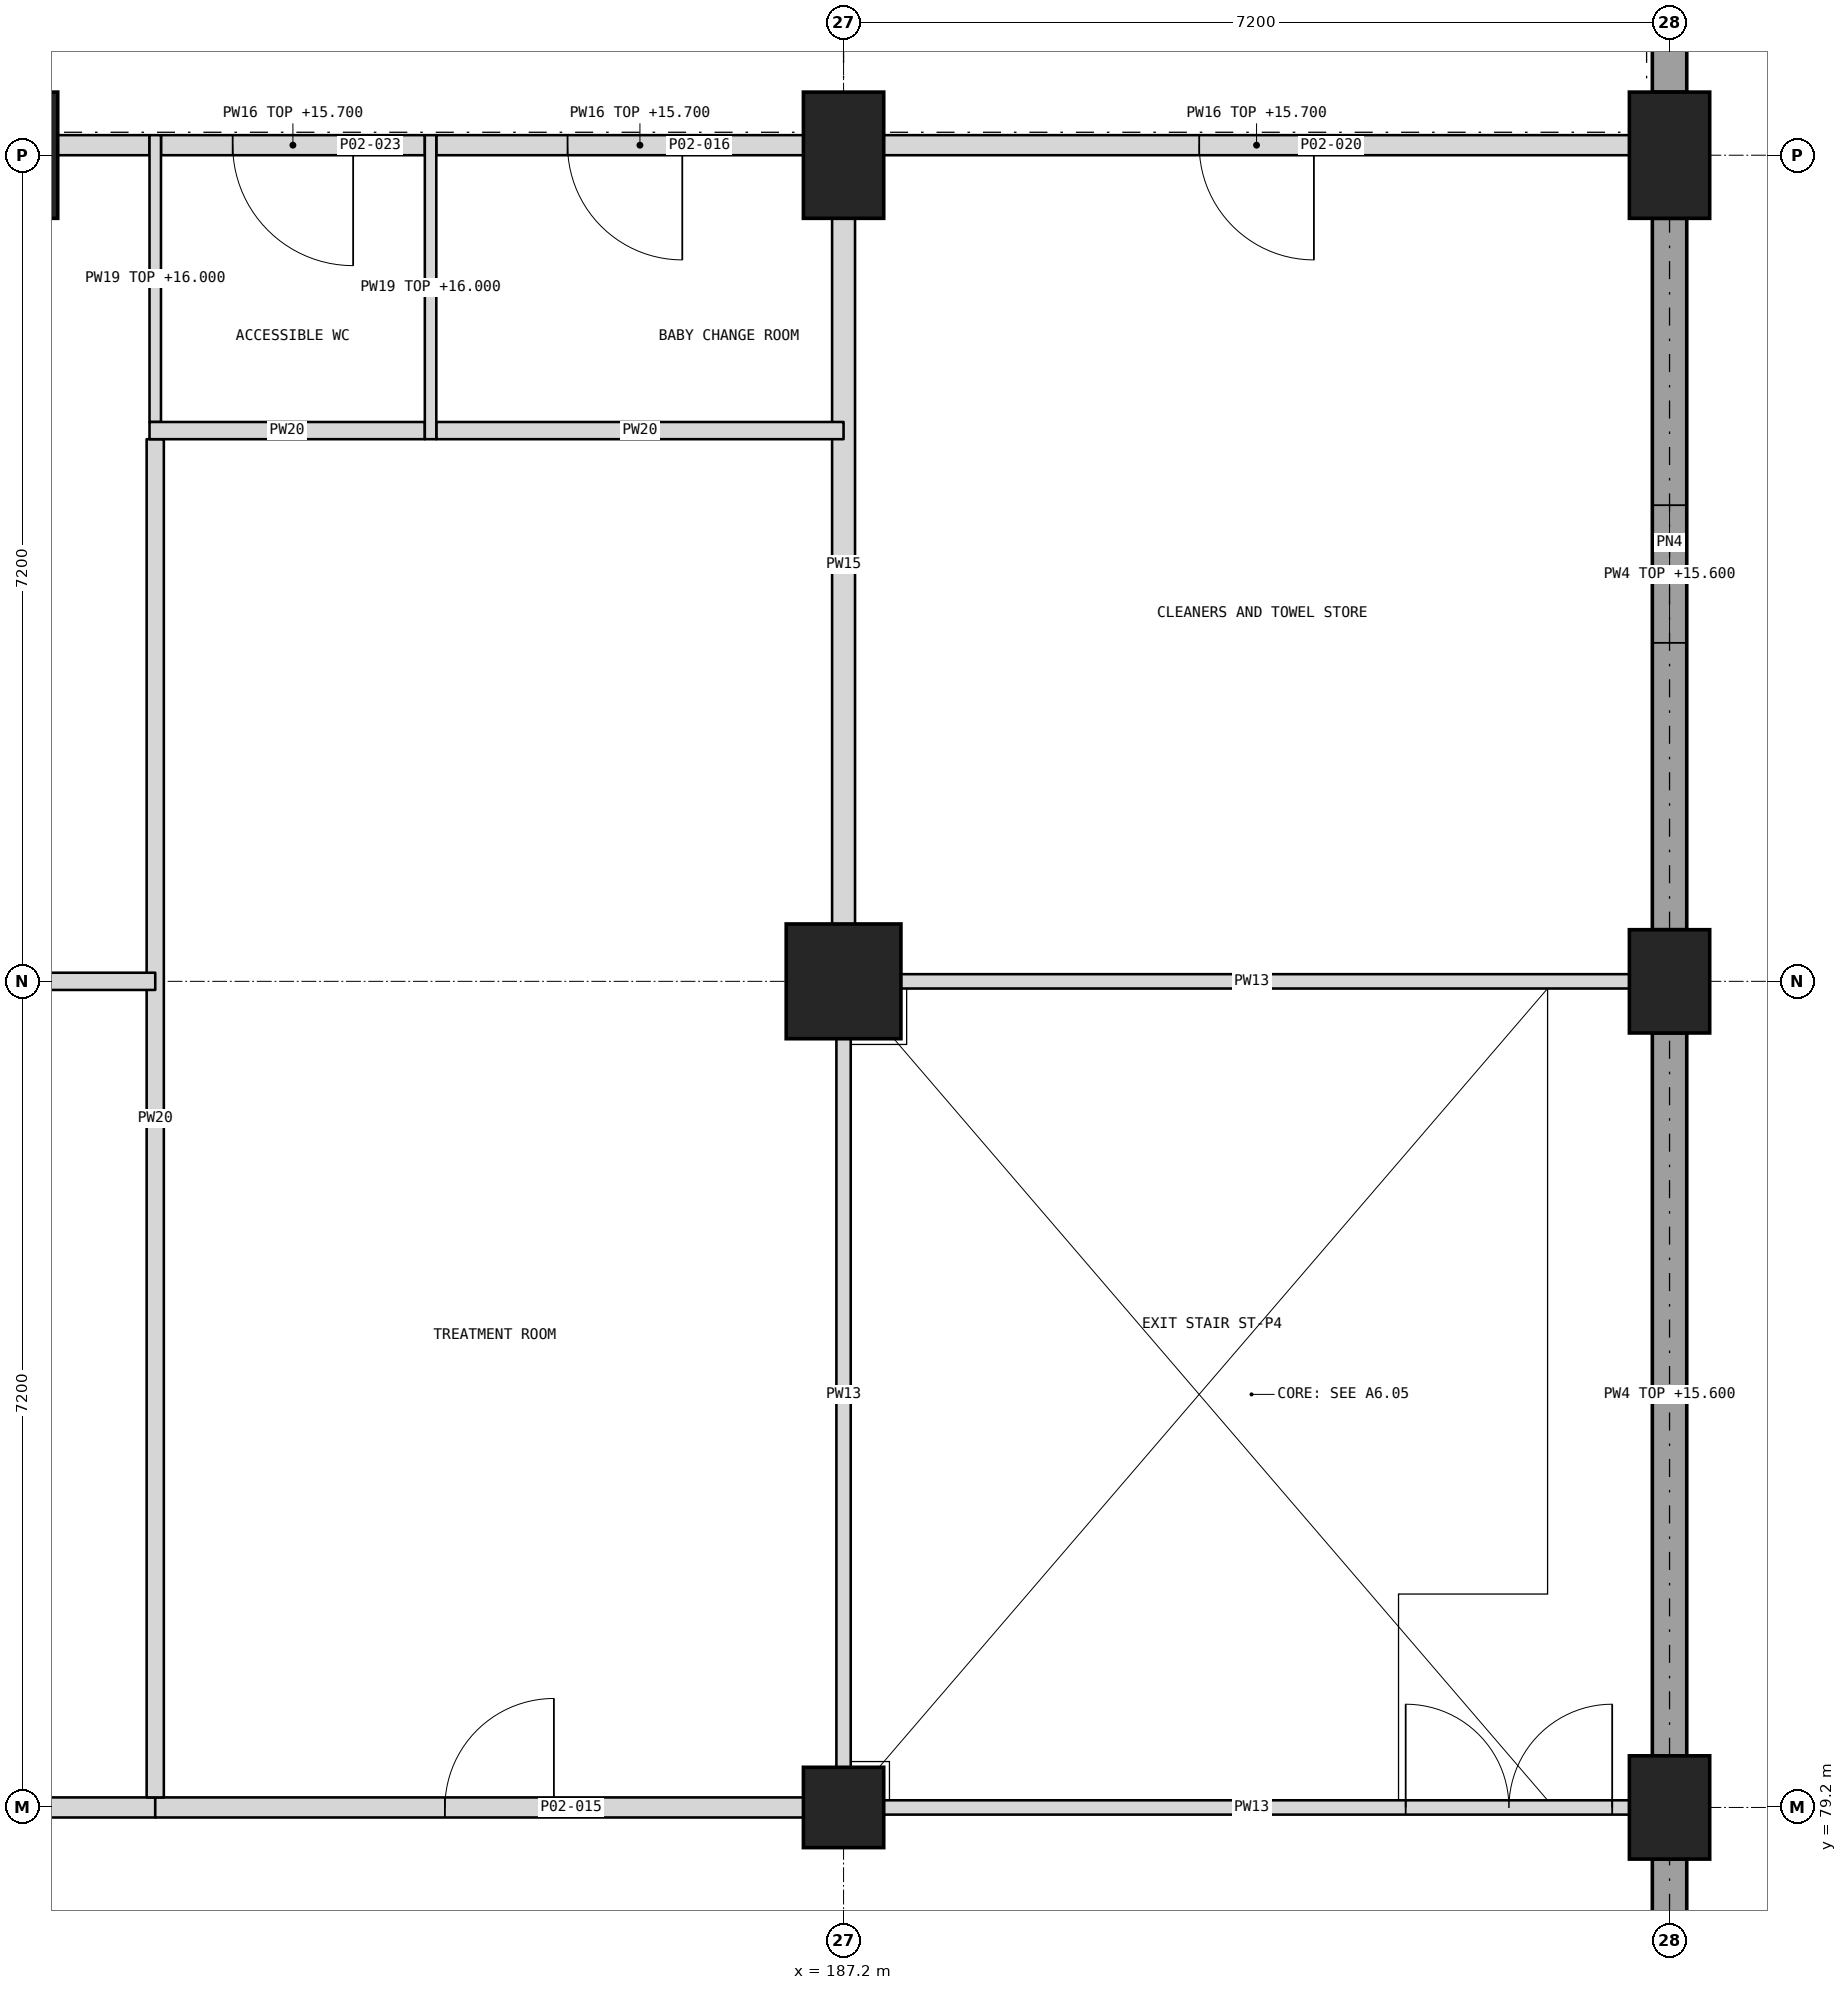
"""IFC4 building model, lengths in metres.
Left out: names, types, materials, properties, quantities, classifications, styles, units other than length and angle.
Written with IfcOpenShell. Run it as: python <this file> out.ifc"""

import sys

from ifc_helpers import new_model, si_unit, direction, frame, frame_2d, origin, origin_2d, place, context, subcontext, project, spatial, rectangle, extrude, element, fill, save


model = new_model("IFC4")
c1 = context("Model", 3, precision=1e-05, world=origin(), true_north=direction((0.0, 1.0)))
c2 = subcontext(c1, "Body", "Model", "MODEL_VIEW")
j1 = project(units=[si_unit("LENGTHUNIT", "METRE"), si_unit("PLANEANGLEUNIT", "RADIAN")], contexts=[c1])
p1 = place(None, origin())
s1 = spatial("IfcSite", under=j1, at=p1, CompositionType="ELEMENT")
p2 = place(p1, origin())
s2 = spatial("IfcBuilding", under=s1, at=p2, CompositionType="ELEMENT")
p3 = place(p2, frame((0.0, 0.0, 12.0)))
s3 = spatial("IfcBuildingStorey", under=s2, at=p3, CompositionType="ELEMENT", Elevation=12.0)
p4 = place(p3, frame((187.2, 79.2, 0.0), z_axis=(0.0, 0.0, 1.0), x_axis=(1.0, 0.0, 0.0)))
e1 = element("IfcColumn", 1, at=p4, inside=s3, PredefinedType="COLUMN", context=c2, shape_type="SweptSolid", body=[
    extrude(rectangle(XDim=0.7, YDim=0.7, at=origin_2d()), origin(), (0.0, 0.0, 1.0), 4.5),
])
p5 = place(p3, frame((187.2, 86.4, 0.0), z_axis=(0.0, 0.0, 1.0), x_axis=(1.0, 0.0, 0.0)))
e2 = element("IfcColumn", 2, at=p5, inside=s3, PredefinedType="COLUMN", context=c2, shape_type="SweptSolid", body=[
    extrude(rectangle(XDim=1.0, YDim=1.0, at=origin_2d()), origin(), (0.0, 0.0, 1.0), 4.5),
])
for number, where, z_axis, x_axis in (
    (3, (194.4, 79.2, 0.0), (0.0, 0.0, 1.0), (1.0, 0.0, 0.0)),
    (4, (194.4, 86.4, 0.0), (0.0, 0.0, 1.0), (1.0, 0.0, 0.0)),
):
    element("IfcColumn", number, at=place(p3, frame(where, z_axis=z_axis, x_axis=x_axis)), inside=s3, PredefinedType="COLUMN", context=c2, shape_type="SweptSolid", body=[
        extrude(rectangle(XDim=0.7, YDim=0.9, at=origin_2d()), origin(), (0.0, 0.0, 1.0), 4.5),
    ])
for number, where, z_axis, x_axis in (
    (5, (180.0, 93.6, 0.0), (0.0, 0.0, 1.0), (1.0, 0.0, 0.0)),
    (6, (187.2, 93.6, 0.0), (0.0, 0.0, 1.0), (1.0, 0.0, 0.0)),
    (7, (194.4, 93.6, 0.0), (0.0, 0.0, 1.0), (1.0, 0.0, 0.0)),
):
    element("IfcColumn", number, at=place(p3, frame(where, z_axis=z_axis, x_axis=x_axis)), inside=s3, PredefinedType="COLUMN", context=c2, shape_type="SweptSolid", body=[
        extrude(rectangle(XDim=0.7, YDim=1.1, at=origin_2d()), origin(), (0.0, 0.0, 1.0), 4.5),
    ])
p6 = place(p3, frame((194.4, 72.45, 0.0), z_axis=(0.0, 0.0, 1.0), x_axis=(0.0, 1.0, 0.0)))
e8 = element("IfcWall", 8, at=p6, inside=s3, PredefinedType="SOLIDWALL", context=c2, shape_type="SweptSolid", body=[
    extrude(rectangle(XDim=6.3, YDim=0.3, at=frame_2d((3.15, 0.0))), origin(), (0.0, 0.0, 1.0), 3.6),
])
p7 = place(p6, frame((0.675, 0.0, 0.9)))
e9 = element("IfcOpeningElement", 9, at=p7, cuts=e8, PredefinedType="OPENING", context=c2, shape_type="SweptSolid", body=[
    extrude(rectangle(XDim=3.0, YDim=2.4, at=frame_2d((1.5, 1.2))), frame((0.0, 0.16, 0.0), z_axis=(0.0, -1.0, 0.0), x_axis=(1.0, 0.0, 0.0)), (0.0, 0.0, 1.0), 0.32),
])
p8 = place(p3, frame((194.4, 79.65, 0.0), z_axis=(0.0, 0.0, 1.0), x_axis=(0.0, 1.0, 0.0)))
e10 = element("IfcWall", 10, at=p8, inside=s3, PredefinedType="SOLIDWALL", context=c2, shape_type="SweptSolid", body=[
    extrude(rectangle(XDim=6.3, YDim=0.3, at=frame_2d((3.15, 0.0))), origin(), (0.0, 0.0, 1.0), 3.6),
])
p9 = place(p3, frame((194.4, 86.85, 0.0), z_axis=(0.0, 0.0, 1.0), x_axis=(0.0, 1.0, 0.0)))
e11 = element("IfcWall", 11, at=p9, inside=s3, PredefinedType="SOLIDWALL", context=c2, shape_type="SweptSolid", body=[
    extrude(rectangle(XDim=6.2, YDim=0.3, at=frame_2d((3.1, 0.0))), origin(), (0.0, 0.0, 1.0), 3.6),
])
p10 = place(p9, frame((2.5, 0.0, 0.9)))
e12 = element("IfcOpeningElement", 12, at=p10, cuts=e11, PredefinedType="OPENING", context=c2, shape_type="SweptSolid", body=[
    extrude(rectangle(XDim=1.2, YDim=1.2, at=frame_2d((0.6, 0.6))), frame((0.0, 0.16, 0.0), z_axis=(0.0, -1.0, 0.0), x_axis=(1.0, 0.0, 0.0)), (0.0, 0.0, 1.0), 0.32),
])
p11 = place(p3, frame((194.4, 94.15, 0.0), z_axis=(0.0, 0.0, 1.0), x_axis=(0.0, 1.0, 0.0)))
e13 = element("IfcWall", 13, at=p11, inside=s3, PredefinedType="SOLIDWALL", context=c2, shape_type="SweptSolid", body=[
    extrude(rectangle(XDim=6.1, YDim=0.3, at=frame_2d((3.05, 0.0))), origin(), (0.0, 0.0, 1.0), 3.7),
])
p12 = place(p11, frame((2.475, 0.0, 0.9)))
e14 = element("IfcOpeningElement", 14, at=p12, cuts=e13, PredefinedType="OPENING", context=c2, shape_type="SweptSolid", body=[
    extrude(rectangle(XDim=3.0, YDim=2.4, at=frame_2d((1.5, 1.2))), frame((0.0, 0.16, 0.0), z_axis=(0.0, -1.0, 0.0), x_axis=(1.0, 0.0, 0.0)), (0.0, 0.0, 1.0), 0.32),
])
p13 = place(p3, frame((169.2, 79.2, 0.0), z_axis=(0.0, 0.0, 1.0), x_axis=(1.0, 0.0, 0.0)))
e15 = element("IfcWall", 15, at=p13, inside=s3, PredefinedType="PARTITIONING", context=c2, shape_type="SweptSolid", body=[
    extrude(rectangle(XDim=12.0, YDim=0.175, at=frame_2d((6.0, 0.0))), origin(), (0.0, 0.0, 1.0), 4.0),
])
p14 = place(p13, frame((5.525, 0.0, 0.0)))
e16 = element("IfcOpeningElement", 16, at=p14, cuts=e15, PredefinedType="OPENING", context=c2, shape_type="SweptSolid", body=[
    extrude(rectangle(XDim=0.95, YDim=2.1, at=frame_2d((0.475, 1.05))), frame((0.0, 0.097, 0.0), z_axis=(0.0, -1.0, 0.0), x_axis=(1.0, 0.0, 0.0)), (0.0, 0.0, 1.0), 0.195),
])
p15 = place(p3, frame((181.2, 79.2, 0.0), z_axis=(0.0, 0.0, 1.0), x_axis=(1.0, 0.0, 0.0)))
e17 = element("IfcWall", 17, at=p15, inside=s3, PredefinedType="PARTITIONING", context=c2, shape_type="SweptSolid", body=[
    extrude(rectangle(XDim=5.938, YDim=0.175, at=frame_2d((2.969, 0.0))), origin(), (0.0, 0.0, 1.0), 4.0),
])
p16 = place(p15, frame((2.525, 0.0, 0.0)))
e18 = element("IfcOpeningElement", 18, at=p16, cuts=e17, PredefinedType="OPENING", context=c2, shape_type="SweptSolid", body=[
    extrude(rectangle(XDim=0.95, YDim=2.1, at=frame_2d((0.475, 1.05))), frame((0.0, 0.097, 0.0), z_axis=(0.0, -1.0, 0.0), x_axis=(1.0, 0.0, 0.0)), (0.0, 0.0, 1.0), 0.195),
])
p17 = place(p3, frame((187.262, 79.2, 0.0), z_axis=(0.0, 0.0, 1.0), x_axis=(1.0, 0.0, 0.0)))
e19 = element("IfcWall", 19, at=p17, inside=s3, PredefinedType="SOLIDWALL", context=c2, shape_type="SweptSolid", body=[
    extrude(rectangle(XDim=6.988, YDim=0.125, at=frame_2d((3.494, 0.0))), origin(), (0.0, 0.0, 1.0), 4.0),
])
p18 = place(p17, frame((4.837, 0.0, 0.0)))
e20 = element("IfcOpeningElement", 20, at=p18, cuts=e19, PredefinedType="OPENING", context=c2, shape_type="SweptSolid", body=[
    extrude(rectangle(XDim=1.8, YDim=2.1, at=frame_2d((0.9, 1.05))), frame((0.0, 0.073, 0.0), z_axis=(0.0, -1.0, 0.0), x_axis=(1.0, 0.0, 0.0)), (0.0, 0.0, 1.0), 0.145),
])
p19 = place(p3, frame((175.25, 93.688, 0.0), z_axis=(0.0, 0.0, 1.0), x_axis=(1.0, 0.0, 0.0)))
e21 = element("IfcWall", 21, at=p19, inside=s3, PredefinedType="PARTITIONING", context=c2, shape_type="SweptSolid", body=[
    extrude(rectangle(XDim=5.9, YDim=0.175, at=frame_2d((2.95, 0.0))), origin(), (0.0, 0.0, 1.0), 3.7),
])
p20 = place(p19, frame((2.45, 0.0, 0.0)))
e22 = element("IfcOpeningElement", 22, at=p20, cuts=e21, PredefinedType="OPENING", context=c2, shape_type="SweptSolid", body=[
    extrude(rectangle(XDim=1.0, YDim=2.1, at=frame_2d((0.5, 1.05))), frame((0.0, 0.097, 0.0), z_axis=(0.0, -1.0, 0.0), x_axis=(1.0, 0.0, 0.0)), (0.0, 0.0, 1.0), 0.195),
])
p21 = place(p3, frame((181.25, 93.688, 0.0), z_axis=(0.0, 0.0, 1.0), x_axis=(1.0, 0.0, 0.0)))
e23 = element("IfcWall", 23, at=p21, inside=s3, PredefinedType="PARTITIONING", context=c2, shape_type="SweptSolid", body=[
    extrude(rectangle(XDim=2.3, YDim=0.175, at=frame_2d((1.15, 0.0))), origin(), (0.0, 0.0, 1.0), 3.7),
])
p22 = place(p21, frame((0.625, 0.0, 0.0)))
e24 = element("IfcOpeningElement", 24, at=p22, cuts=e23, PredefinedType="OPENING", context=c2, shape_type="SweptSolid", body=[
    extrude(rectangle(XDim=1.05, YDim=2.1, at=frame_2d((0.525, 1.05))), frame((0.0, 0.097, 0.0), z_axis=(0.0, -1.0, 0.0), x_axis=(1.0, 0.0, 0.0)), (0.0, 0.0, 1.0), 0.195),
])
p23 = place(p3, frame((183.65, 93.688, 0.0), z_axis=(0.0, 0.0, 1.0), x_axis=(1.0, 0.0, 0.0)))
e25 = element("IfcWall", 25, at=p23, inside=s3, PredefinedType="PARTITIONING", context=c2, shape_type="SweptSolid", body=[
    extrude(rectangle(XDim=3.55, YDim=0.175, at=frame_2d((1.775, 0.0))), origin(), (0.0, 0.0, 1.0), 3.7),
])
p24 = place(p23, frame((1.144, 0.0, 0.0)))
e26 = element("IfcOpeningElement", 26, at=p24, cuts=e25, PredefinedType="OPENING", context=c2, shape_type="SweptSolid", body=[
    extrude(rectangle(XDim=1.0, YDim=2.1, at=frame_2d((0.5, 1.05))), frame((0.0, 0.097, 0.0), z_axis=(0.0, -1.0, 0.0), x_axis=(1.0, 0.0, 0.0)), (0.0, 0.0, 1.0), 0.195),
])
p25 = place(p3, frame((187.55, 93.688, 0.0), z_axis=(0.0, 0.0, 1.0), x_axis=(1.0, 0.0, 0.0)))
e27 = element("IfcWall", 27, at=p25, inside=s3, PredefinedType="PARTITIONING", context=c2, shape_type="SweptSolid", body=[
    extrude(rectangle(XDim=6.5, YDim=0.175, at=frame_2d((3.25, 0.0))), origin(), (0.0, 0.0, 1.0), 3.7),
])
p26 = place(p25, frame((2.75, 0.0, 0.0)))
e28 = element("IfcOpeningElement", 28, at=p26, cuts=e27, PredefinedType="OPENING", context=c2, shape_type="SweptSolid", body=[
    extrude(rectangle(XDim=1.0, YDim=2.2, at=frame_2d((0.5, 1.1))), frame((0.0, 0.097, 0.0), z_axis=(0.0, -1.0, 0.0), x_axis=(1.0, 0.0, 0.0)), (0.0, 0.0, 1.0), 0.195),
])
p27 = place(p3, frame((181.2, 79.288, 0.0), z_axis=(0.0, 0.0, 1.0), x_axis=(0.0, 1.0, 0.0)))
e29 = element("IfcWall", 29, at=p27, inside=s3, PredefinedType="PARTITIONING", context=c2, shape_type="SweptSolid", body=[
    extrude(rectangle(XDim=11.837, YDim=0.15, at=frame_2d((5.919, 0.0))), origin(), (0.0, 0.0, 1.0), 4.0),
])
p28 = place(p3, frame((181.2, 91.275, 0.0), z_axis=(0.0, 0.0, 1.0), x_axis=(0.0, 1.0, 0.0)))
e30 = element("IfcWall", 30, at=p28, inside=s3, PredefinedType="PARTITIONING", context=c2, shape_type="SweptSolid", body=[
    extrude(rectangle(XDim=2.5, YDim=0.1, at=frame_2d((1.25, 0.0))), origin(), (0.0, 0.0, 1.0), 4.0),
])
p29 = place(p3, frame((175.25, 86.4, 0.0), z_axis=(0.0, 0.0, 1.0), x_axis=(1.0, 0.0, 0.0)))
e31 = element("IfcWall", 31, at=p29, inside=s3, PredefinedType="PARTITIONING", context=c2, shape_type="SweptSolid", body=[
    extrude(rectangle(XDim=5.95, YDim=0.15, at=frame_2d((2.975, 0.0))), origin(), (0.0, 0.0, 1.0), 4.0),
])
p30 = place(p3, frame((187.262, 86.4, 0.0), z_axis=(0.0, 0.0, 1.0), x_axis=(1.0, 0.0, 0.0)))
e32 = element("IfcWall", 32, at=p30, inside=s3, PredefinedType="SOLIDWALL", context=c2, shape_type="SweptSolid", body=[
    extrude(rectangle(XDim=6.988, YDim=0.125, at=frame_2d((3.494, 0.0))), origin(), (0.0, 0.0, 1.0), 4.0),
])
p31 = place(p3, frame((187.2, 79.137, 0.0), z_axis=(0.0, 0.0, 1.0), x_axis=(0.0, 1.0, 0.0)))
e33 = element("IfcWall", 33, at=p31, inside=s3, PredefinedType="SOLIDWALL", context=c2, shape_type="SweptSolid", body=[
    extrude(rectangle(XDim=7.325, YDim=0.125, at=frame_2d((3.663, 0.0))), origin(), (0.0, 0.0, 1.0), 4.0),
])
p32 = place(p3, frame((187.2, 86.462, 0.0), z_axis=(0.0, 0.0, 1.0), x_axis=(0.0, 1.0, 0.0)))
e34 = element("IfcWall", 34, at=p32, inside=s3, PredefinedType="PARTITIONING", context=c2, shape_type="SweptSolid", body=[
    extrude(rectangle(XDim=7.138, YDim=0.2, at=frame_2d((3.569, 0.0))), origin(), (0.0, 0.0, 1.0), 4.0),
])
p33 = place(p3, frame((181.15, 91.2, 0.0), z_axis=(0.0, 0.0, 1.0), x_axis=(1.0, 0.0, 0.0)))
e35 = element("IfcWall", 35, at=p33, inside=s3, PredefinedType="PARTITIONING", context=c2, shape_type="SweptSolid", body=[
    extrude(rectangle(XDim=2.4, YDim=0.15, at=frame_2d((1.2, 0.0))), origin(), (0.0, 0.0, 1.0), 4.0),
])
p34 = place(p3, frame((183.65, 91.2, 0.0), z_axis=(0.0, 0.0, 1.0), x_axis=(1.0, 0.0, 0.0)))
e36 = element("IfcWall", 36, at=p34, inside=s3, PredefinedType="PARTITIONING", context=c2, shape_type="SweptSolid", body=[
    extrude(rectangle(XDim=3.55, YDim=0.15, at=frame_2d((1.775, 0.0))), origin(), (0.0, 0.0, 1.0), 4.0),
])
p35 = place(p3, frame((183.6, 91.125, 0.0), z_axis=(0.0, 0.0, 1.0), x_axis=(0.0, 1.0, 0.0)))
e37 = element("IfcWall", 37, at=p35, inside=s3, PredefinedType="PARTITIONING", context=c2, shape_type="SweptSolid", body=[
    extrude(rectangle(XDim=2.65, YDim=0.1, at=frame_2d((1.325, 0.0))), origin(), (0.0, 0.0, 1.0), 4.0),
])
p36 = place(p10, origin())
e38 = element("IfcWindow", 38, at=p36, inside=s3, PartitioningType="SINGLE_PANEL", PredefinedType="WINDOW", context=c2, shape_type="SweptSolid", body=[
    extrude(rectangle(XDim=1.2, YDim=1.2, at=frame_2d((0.6, 0.6))), frame((0.0, 0.12, 0.0), z_axis=(0.0, -1.0, 0.0), x_axis=(1.0, 0.0, 0.0)), (0.0, 0.0, 1.0), 0.06),
])
fill(e12, e38)
p37 = place(p16, origin())
e39 = element("IfcDoor", 39, at=p37, inside=s3, OperationType="SINGLE_SWING_RIGHT", PredefinedType="DOOR", context=c2, shape_type="SweptSolid", body=[
    extrude(rectangle(XDim=0.95, YDim=2.1, at=frame_2d((0.475, 1.05))), frame((0.0, 0.025, 0.0), z_axis=(0.0, -1.0, 0.0), x_axis=(1.0, 0.0, 0.0)), (0.0, 0.0, 1.0), 0.05),
])
fill(e18, e39)
p38 = place(p24, frame((1.0, 0.0, 0.0), z_axis=(0.0, 0.0, 1.0), x_axis=(-1.0, 0.0, 0.0)))
e40 = element("IfcDoor", 40, at=p38, inside=s3, OperationType="SINGLE_SWING_LEFT", PredefinedType="DOOR", context=c2, shape_type="SweptSolid", body=[
    extrude(rectangle(XDim=1.0, YDim=2.1, at=frame_2d((0.5, 1.05))), frame((0.0, 0.025, 0.0), z_axis=(0.0, -1.0, 0.0), x_axis=(1.0, 0.0, 0.0)), (0.0, 0.0, 1.0), 0.05),
])
fill(e26, e40)
p39 = place(p18, origin())
e41 = element("IfcDoor", 41, at=p39, inside=s3, OperationType="DOUBLE_DOOR_SINGLE_SWING", PredefinedType="DOOR", context=c2, shape_type="SweptSolid", body=[
    extrude(rectangle(XDim=1.8, YDim=2.1, at=frame_2d((0.9, 1.05))), frame((0.0, 0.025, 0.0), z_axis=(0.0, -1.0, 0.0), x_axis=(1.0, 0.0, 0.0)), (0.0, 0.0, 1.0), 0.05),
])
fill(e20, e41)
p40 = place(p26, frame((1.0, 0.0, 0.0), z_axis=(0.0, 0.0, 1.0), x_axis=(-1.0, 0.0, 0.0)))
e42 = element("IfcDoor", 42, at=p40, inside=s3, OperationType="SINGLE_SWING_LEFT", PredefinedType="DOOR", context=c2, shape_type="SweptSolid", body=[
    extrude(rectangle(XDim=1.0, YDim=2.2, at=frame_2d((0.5, 1.1))), frame((0.0, 0.025, 0.0), z_axis=(0.0, -1.0, 0.0), x_axis=(1.0, 0.0, 0.0)), (0.0, 0.0, 1.0), 0.05),
])
fill(e28, e42)
p41 = place(p22, frame((1.05, 0.0, 0.0), z_axis=(0.0, 0.0, 1.0), x_axis=(-1.0, 0.0, 0.0)))
e43 = element("IfcDoor", 43, at=p41, inside=s3, OperationType="SINGLE_SWING_LEFT", PredefinedType="DOOR", context=c2, shape_type="SweptSolid", body=[
    extrude(rectangle(XDim=1.05, YDim=2.1, at=frame_2d((0.525, 1.05))), frame((0.0, 0.025, 0.0), z_axis=(0.0, -1.0, 0.0), x_axis=(1.0, 0.0, 0.0)), (0.0, 0.0, 1.0), 0.05),
])
fill(e24, e43)
save(model, sys.argv[1])
